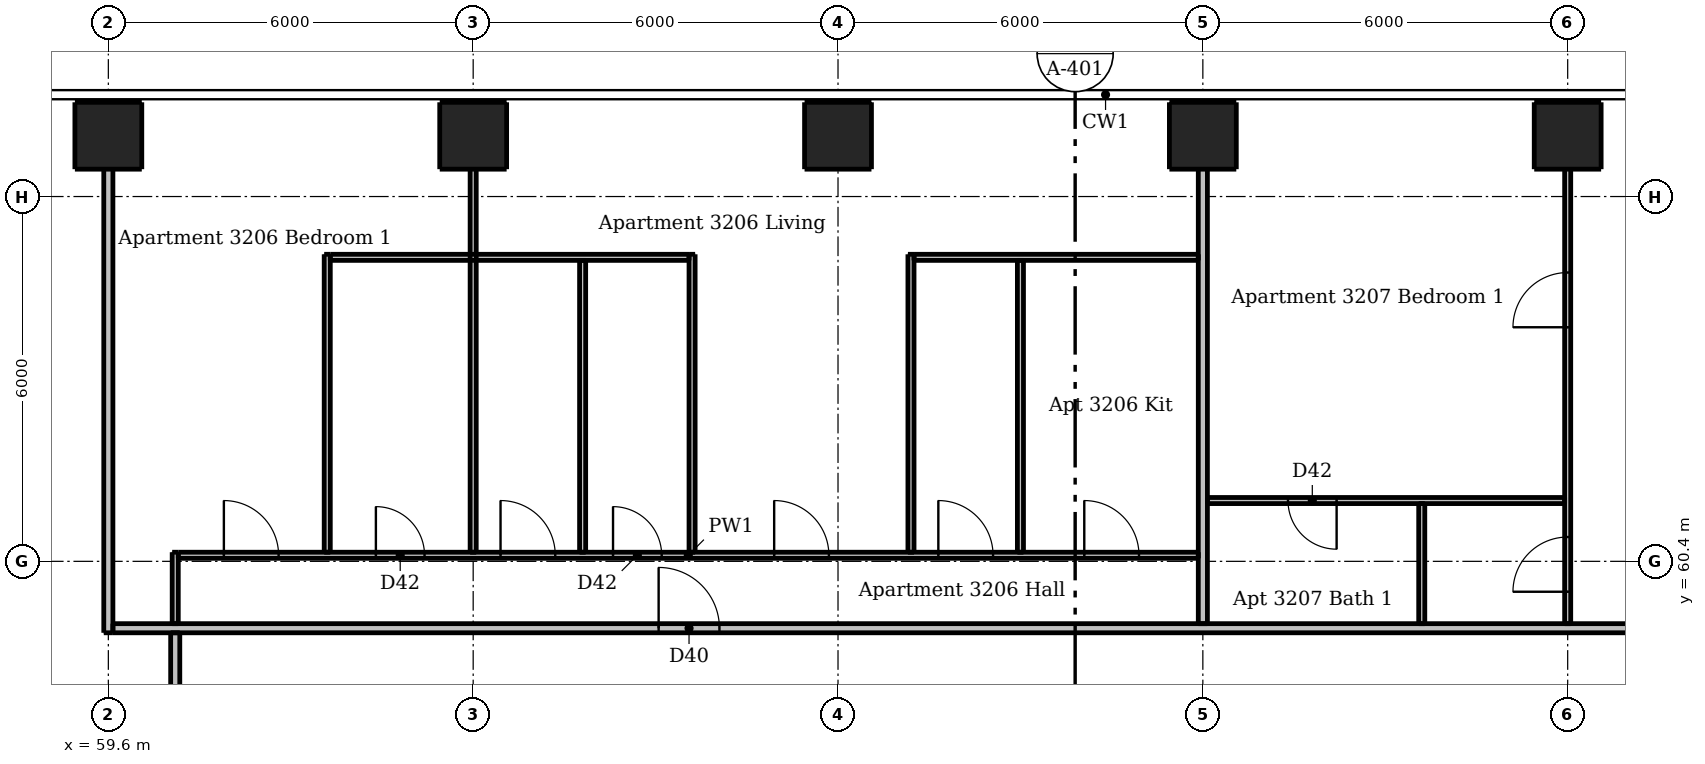
"""IFC4 building model, lengths in metres.
Left out: names, types, materials, properties, quantities, classifications, styles, units other than length and angle.
Written with IfcOpenShell. Run it as: python <this file> out.ifc"""

import sys

from ifc_helpers import new_model, si_unit, direction, frame, frame_2d, origin, origin_2d, place, context, subcontext, project, spatial, rectangle, extrude, element, fill, save


model = new_model("IFC4")
c1 = context("Model", 3, precision=1e-05, world=origin(), true_north=direction((0.0, 1.0)))
c2 = subcontext(c1, "Body", "Model", "MODEL_VIEW")
j1 = project(units=[si_unit("LENGTHUNIT", "METRE"), si_unit("PLANEANGLEUNIT", "RADIAN")], contexts=[c1])
p1 = place(None, origin())
s1 = spatial("IfcSite", under=j1, at=p1, CompositionType="ELEMENT")
p2 = place(p1, origin())
s2 = spatial("IfcBuilding", under=s1, at=p2, CompositionType="ELEMENT")
p3 = place(p2, frame((0.0, 0.0, 118.3)))
s3 = spatial("IfcBuildingStorey", under=s2, at=p3, CompositionType="ELEMENT", Elevation=118.3)
for number, where, z_axis, x_axis in (
    (1, (59.6, 67.4, 0.0), (0.0, 0.0, 1.0), (1.0, 0.0, 0.0)),
    (2, (65.6, 67.4, 0.0), (0.0, 0.0, 1.0), (1.0, 0.0, 0.0)),
    (3, (71.6, 67.4, 0.0), (0.0, 0.0, 1.0), (1.0, 0.0, 0.0)),
    (4, (77.6, 67.4, 0.0), (0.0, 0.0, 1.0), (1.0, 0.0, 0.0)),
    (5, (83.6, 67.4, 0.0), (0.0, 0.0, 1.0), (1.0, 0.0, 0.0)),
):
    element("IfcColumn", number, at=place(p3, frame(where, z_axis=z_axis, x_axis=x_axis)), inside=s3, PredefinedType="COLUMN", context=c2, shape_type="SweptSolid", body=[
        extrude(rectangle(XDim=1.1, YDim=1.1, at=origin_2d()), origin(), (0.0, 0.0, 1.0), 3.05),
    ])
p4 = place(p3, frame((60.7, 59.375, 0.0), z_axis=(0.0, 0.0, 1.0), x_axis=(0.0, 1.0, 0.0)))
e6 = element("IfcWall", 6, at=p4, inside=s3, PredefinedType="PARTITIONING", context=c2, shape_type="SweptSolid", body=[
    extrude(rectangle(XDim=1.175, YDim=0.1, at=frame_2d((0.587, 0.0))), origin(), (0.0, 0.0, 1.0), 3.05),
])
p5 = place(p3, frame((63.2, 60.55, 0.0), z_axis=(0.0, 0.0, 1.0), x_axis=(0.0, 1.0, 0.0)))
e7 = element("IfcWall", 7, at=p5, inside=s3, PredefinedType="PARTITIONING", context=c2, shape_type="SweptSolid", body=[
    extrude(rectangle(XDim=4.9, YDim=0.1, at=frame_2d((2.45, 0.0))), origin(), (0.0, 0.0, 1.0), 3.05),
])
p6 = place(p3, frame((65.6, 60.55, 0.0), z_axis=(0.0, 0.0, 1.0), x_axis=(0.0, 1.0, 0.0)))
e8 = element("IfcWall", 8, at=p6, inside=s3, PredefinedType="PARTITIONING", context=c2, shape_type="SweptSolid", body=[
    extrude(rectangle(XDim=7.45, YDim=0.1, at=frame_2d((3.725, 0.0))), origin(), (0.0, 0.0, 1.0), 2.516),
])
p7 = place(p3, frame((67.4, 60.55, 0.0), z_axis=(0.0, 0.0, 1.0), x_axis=(0.0, 1.0, 0.0)))
e9 = element("IfcWall", 9, at=p7, inside=s3, PredefinedType="PARTITIONING", context=c2, shape_type="SweptSolid", body=[
    extrude(rectangle(XDim=4.8, YDim=0.1, at=frame_2d((2.4, 0.0))), origin(), (0.0, 0.0, 1.0), 3.05),
])
for number, where, z_axis, x_axis in (
    (10, (69.2, 60.55, 0.0), (0.0, 0.0, 1.0), (0.0, 1.0, 0.0)),
    (11, (72.8, 60.55, 0.0), (0.0, 0.0, 1.0), (0.0, 1.0, 0.0)),
):
    element("IfcWall", number, at=place(p3, frame(where, z_axis=z_axis, x_axis=x_axis)), inside=s3, PredefinedType="PARTITIONING", context=c2, shape_type="SweptSolid", body=[
        extrude(rectangle(XDim=4.9, YDim=0.1, at=frame_2d((2.45, 0.0))), origin(), (0.0, 0.0, 1.0), 3.05),
    ])
p8 = place(p3, frame((74.6, 60.55, 0.0), z_axis=(0.0, 0.0, 1.0), x_axis=(0.0, 1.0, 0.0)))
e12 = element("IfcWall", 12, at=p8, inside=s3, PredefinedType="PARTITIONING", context=c2, shape_type="SweptSolid", body=[
    extrude(rectangle(XDim=4.8, YDim=0.1, at=frame_2d((2.4, 0.0))), origin(), (0.0, 0.0, 1.0), 3.05),
])
p9 = place(p3, frame((81.2, 59.375, 0.0), z_axis=(0.0, 0.0, 1.0), x_axis=(0.0, 1.0, 0.0)))
e13 = element("IfcWall", 13, at=p9, inside=s3, PredefinedType="PARTITIONING", context=c2, shape_type="SweptSolid", body=[
    extrude(rectangle(XDim=1.975, YDim=0.1, at=frame_2d((0.988, 0.0))), origin(), (0.0, 0.0, 1.0), 3.05),
])
p10 = place(p3, frame((83.6, 59.375, 0.0), z_axis=(0.0, 0.0, 1.0), x_axis=(0.0, 1.0, 0.0)))
e14 = element("IfcWall", 14, at=p10, inside=s3, PredefinedType="PARTITIONING", context=c2, shape_type="SweptSolid", body=[
    extrude(rectangle(XDim=8.625, YDim=0.1, at=frame_2d((4.312, 0.0))), origin(), (0.0, 0.0, 1.0), 2.516),
])
p11 = place(p10, frame((0.525, 0.0, 0.0)))
e15 = element("IfcOpeningElement", 15, at=p11, cuts=e14, PredefinedType="OPENING", context=c2, shape_type="SweptSolid", body=[
    extrude(rectangle(XDim=0.9, YDim=2.1, at=frame_2d((0.45, 1.05))), frame((0.0, 0.06, 0.0), z_axis=(0.0, -1.0, 0.0), x_axis=(1.0, 0.0, 0.0)), (0.0, 0.0, 1.0), 0.12),
])
p12 = place(p10, frame((4.875, 0.0, 0.0)))
e16 = element("IfcOpeningElement", 16, at=p12, cuts=e14, PredefinedType="OPENING", context=c2, shape_type="SweptSolid", body=[
    extrude(rectangle(XDim=0.9, YDim=2.1, at=frame_2d((0.45, 1.05))), frame((0.0, 0.06, 0.0), z_axis=(0.0, -1.0, 0.0), x_axis=(1.0, 0.0, 0.0)), (0.0, 0.0, 1.0), 0.12),
])
p13 = place(p3, frame((63.25, 65.4, 0.0), z_axis=(0.0, 0.0, 1.0), x_axis=(1.0, 0.0, 0.0)))
e17 = element("IfcWall", 17, at=p13, inside=s3, PredefinedType="PARTITIONING", context=c2, shape_type="SweptSolid", body=[
    extrude(rectangle(XDim=5.9, YDim=0.1, at=frame_2d((2.95, 0.0))), origin(), (0.0, 0.0, 1.0), 3.05),
])
p14 = place(p3, frame((72.85, 65.4, 0.0), z_axis=(0.0, 0.0, 1.0), x_axis=(1.0, 0.0, 0.0)))
e18 = element("IfcWall", 18, at=p14, inside=s3, PredefinedType="PARTITIONING", context=c2, shape_type="SweptSolid", body=[
    extrude(rectangle(XDim=4.675, YDim=0.1, at=frame_2d((2.337, 0.0))), origin(), (0.0, 0.0, 1.0), 3.05),
])
p15 = place(p3, frame((83.55, 61.4, 0.0), z_axis=(0.0, 0.0, 1.0), x_axis=(-1.0, 0.0, 0.0)))
e19 = element("IfcWall", 19, at=p15, inside=s3, PredefinedType="PARTITIONING", context=c2, shape_type="SweptSolid", body=[
    extrude(rectangle(XDim=5.875, YDim=0.1, at=frame_2d((2.938, 0.0))), origin(), (0.0, 0.0, 1.0), 3.05),
])
p16 = place(p15, frame((3.75, 0.0, 0.0)))
e20 = element("IfcOpeningElement", 20, at=p16, cuts=e19, PredefinedType="OPENING", context=c2, shape_type="SweptSolid", body=[
    extrude(rectangle(XDim=0.8, YDim=2.1, at=frame_2d((0.4, 1.05))), frame((0.0, 0.06, 0.0), z_axis=(0.0, -1.0, 0.0), x_axis=(1.0, 0.0, 0.0)), (0.0, 0.0, 1.0), 0.12),
])
p17 = place(p3, frame((60.75, 60.5, 0.0), z_axis=(0.0, 0.0, 1.0), x_axis=(1.0, 0.0, 0.0)))
e21 = element("IfcWall", 21, at=p17, inside=s3, PredefinedType="PARTITIONING", context=c2, shape_type="SweptSolid", body=[
    extrude(rectangle(XDim=16.775, YDim=0.1, at=frame_2d((8.387, 0.0))), origin(), (0.0, 0.0, 1.0), 3.05),
])
p18 = place(p17, frame((9.8, 0.0, 0.0)))
e22 = element("IfcOpeningElement", 22, at=p18, cuts=e21, PredefinedType="OPENING", context=c2, shape_type="SweptSolid", body=[
    extrude(rectangle(XDim=0.9, YDim=2.1, at=frame_2d((0.45, 1.05))), frame((0.0, 0.06, 0.0), z_axis=(0.0, -1.0, 0.0), x_axis=(1.0, 0.0, 0.0)), (0.0, 0.0, 1.0), 0.12),
])
p19 = place(p17, frame((14.9, 0.0, 0.0)))
e23 = element("IfcOpeningElement", 23, at=p19, cuts=e21, PredefinedType="OPENING", context=c2, shape_type="SweptSolid", body=[
    extrude(rectangle(XDim=0.9, YDim=2.1, at=frame_2d((0.45, 1.05))), frame((0.0, 0.06, 0.0), z_axis=(0.0, -1.0, 0.0), x_axis=(1.0, 0.0, 0.0)), (0.0, 0.0, 1.0), 0.12),
])
p20 = place(p17, frame((12.5, 0.0, 0.0)))
e24 = element("IfcOpeningElement", 24, at=p20, cuts=e21, PredefinedType="OPENING", context=c2, shape_type="SweptSolid", body=[
    extrude(rectangle(XDim=0.9, YDim=2.1, at=frame_2d((0.45, 1.05))), frame((0.0, 0.06, 0.0), z_axis=(0.0, -1.0, 0.0), x_axis=(1.0, 0.0, 0.0)), (0.0, 0.0, 1.0), 0.12),
])
p21 = place(p17, frame((5.3, 0.0, 0.0)))
e25 = element("IfcOpeningElement", 25, at=p21, cuts=e21, PredefinedType="OPENING", context=c2, shape_type="SweptSolid", body=[
    extrude(rectangle(XDim=0.9, YDim=2.1, at=frame_2d((0.45, 1.05))), frame((0.0, 0.06, 0.0), z_axis=(0.0, -1.0, 0.0), x_axis=(1.0, 0.0, 0.0)), (0.0, 0.0, 1.0), 0.12),
])
p22 = place(p17, frame((7.15, 0.0, 0.0)))
e26 = element("IfcOpeningElement", 26, at=p22, cuts=e21, PredefinedType="OPENING", context=c2, shape_type="SweptSolid", body=[
    extrude(rectangle(XDim=0.8, YDim=2.1, at=frame_2d((0.4, 1.05))), frame((0.0, 0.06, 0.0), z_axis=(0.0, -1.0, 0.0), x_axis=(1.0, 0.0, 0.0)), (0.0, 0.0, 1.0), 0.12),
])
p23 = place(p17, frame((0.75, 0.0, 0.0)))
e27 = element("IfcOpeningElement", 27, at=p23, cuts=e21, PredefinedType="OPENING", context=c2, shape_type="SweptSolid", body=[
    extrude(rectangle(XDim=0.9, YDim=2.1, at=frame_2d((0.45, 1.05))), frame((0.0, 0.06, 0.0), z_axis=(0.0, -1.0, 0.0), x_axis=(1.0, 0.0, 0.0)), (0.0, 0.0, 1.0), 0.12),
])
p24 = place(p17, frame((3.25, 0.0, 0.0)))
e28 = element("IfcOpeningElement", 28, at=p24, cuts=e21, PredefinedType="OPENING", context=c2, shape_type="SweptSolid", body=[
    extrude(rectangle(XDim=0.8, YDim=2.1, at=frame_2d((0.4, 1.05))), frame((0.0, 0.06, 0.0), z_axis=(0.0, -1.0, 0.0), x_axis=(1.0, 0.0, 0.0)), (0.0, 0.0, 1.0), 0.12),
])
p25 = place(p3, frame((59.6, 59.225, 0.0), z_axis=(0.0, 0.0, 1.0), x_axis=(0.0, 1.0, 0.0)))
e29 = element("IfcWall", 29, at=p25, inside=s3, PredefinedType="PARTITIONING", context=c2, shape_type="SweptSolid", body=[
    extrude(rectangle(XDim=8.775, YDim=0.15, at=frame_2d((4.387, 0.0))), origin(), (0.0, 0.0, 1.0), 2.51),
])
p26 = place(p3, frame((60.7, 30.325, 0.0), z_axis=(0.0, 0.0, 1.0), x_axis=(0.0, 1.0, 0.0)))
e30 = element("IfcWall", 30, at=p26, inside=s3, PredefinedType="PARTITIONING", context=c2, shape_type="SweptSolid", body=[
    extrude(rectangle(XDim=28.9, YDim=0.15, at=frame_2d((14.45, 0.0))), origin(), (0.0, 0.0, 1.0), 3.05),
])
p27 = place(p26, frame((9.225, 0.0, 0.0)))
e31 = element("IfcOpeningElement", 31, at=p27, cuts=e30, PredefinedType="OPENING", context=c2, shape_type="SweptSolid", body=[
    extrude(rectangle(XDim=1.0, YDim=2.1, at=frame_2d((0.5, 1.05))), frame((0.0, 0.085, 0.0), z_axis=(0.0, -1.0, 0.0), x_axis=(1.0, 0.0, 0.0)), (0.0, 0.0, 1.0), 0.17),
])
p28 = place(p26, frame((26.025, 0.0, 0.0)))
e32 = element("IfcOpeningElement", 32, at=p28, cuts=e30, PredefinedType="OPENING", context=c2, shape_type="SweptSolid", body=[
    extrude(rectangle(XDim=1.0, YDim=2.1, at=frame_2d((0.5, 1.05))), frame((0.0, 0.085, 0.0), z_axis=(0.0, -1.0, 0.0), x_axis=(1.0, 0.0, 0.0)), (0.0, 0.0, 1.0), 0.17),
])
p29 = place(p3, frame((77.6, 59.375, 0.0), z_axis=(0.0, 0.0, 1.0), x_axis=(0.0, 1.0, 0.0)))
e33 = element("IfcWall", 33, at=p29, inside=s3, PredefinedType="PARTITIONING", context=c2, shape_type="SweptSolid", body=[
    extrude(rectangle(XDim=8.625, YDim=0.15, at=frame_2d((4.312, 0.0))), origin(), (0.0, 0.0, 1.0), 2.516),
])
p30 = place(p3, frame((59.675, 59.3, 0.0), z_axis=(0.0, 0.0, 1.0), x_axis=(1.0, 0.0, 0.0)))
e34 = element("IfcWall", 34, at=p30, inside=s3, PredefinedType="PARTITIONING", context=c2, shape_type="SweptSolid", body=[
    extrude(rectangle(XDim=28.55, YDim=0.15, at=frame_2d((14.275, 0.0))), origin(), (0.0, 0.0, 1.0), 3.05),
])
p31 = place(p30, frame((8.975, 0.0, 0.0)))
e35 = element("IfcOpeningElement", 35, at=p31, cuts=e34, PredefinedType="OPENING", context=c2, shape_type="SweptSolid", body=[
    extrude(rectangle(XDim=1.0, YDim=2.1, at=frame_2d((0.5, 1.05))), frame((0.0, 0.085, 0.0), z_axis=(0.0, -1.0, 0.0), x_axis=(1.0, 0.0, 0.0)), (0.0, 0.0, 1.0), 0.17),
])
p32 = place(p30, frame((25.775, 0.0, 0.0)))
e36 = element("IfcOpeningElement", 36, at=p32, cuts=e34, PredefinedType="OPENING", context=c2, shape_type="SweptSolid", body=[
    extrude(rectangle(XDim=1.0, YDim=2.1, at=frame_2d((0.5, 1.05))), frame((0.0, 0.085, 0.0), z_axis=(0.0, -1.0, 0.0), x_axis=(1.0, 0.0, 0.0)), (0.0, 0.0, 1.0), 0.17),
])
p33 = place(p31, origin())
e37 = element("IfcDoor", 37, at=p33, inside=s3, OperationType="SINGLE_SWING_LEFT", PredefinedType="DOOR", context=c2, shape_type="SweptSolid", body=[
    extrude(rectangle(XDim=1.0, YDim=2.1, at=frame_2d((0.5, 1.05))), frame((0.0, 0.025, 0.0), z_axis=(0.0, -1.0, 0.0), x_axis=(1.0, 0.0, 0.0)), (0.0, 0.0, 1.0), 0.05),
])
fill(e35, e37)
p34 = place(p18, origin())
e38 = element("IfcDoor", 38, at=p34, inside=s3, OperationType="SINGLE_SWING_LEFT", PredefinedType="DOOR", context=c2, shape_type="SweptSolid", body=[
    extrude(rectangle(XDim=0.9, YDim=2.1, at=frame_2d((0.45, 1.05))), frame((0.0, 0.025, 0.0), z_axis=(0.0, -1.0, 0.0), x_axis=(1.0, 0.0, 0.0)), (0.0, 0.0, 1.0), 0.05),
])
fill(e22, e38)
p35 = place(p19, origin())
e39 = element("IfcDoor", 39, at=p35, inside=s3, OperationType="SINGLE_SWING_LEFT", PredefinedType="DOOR", context=c2, shape_type="SweptSolid", body=[
    extrude(rectangle(XDim=0.9, YDim=2.1, at=frame_2d((0.45, 1.05))), frame((0.0, 0.025, 0.0), z_axis=(0.0, -1.0, 0.0), x_axis=(1.0, 0.0, 0.0)), (0.0, 0.0, 1.0), 0.05),
])
fill(e23, e39)
p36 = place(p20, origin())
e40 = element("IfcDoor", 40, at=p36, inside=s3, OperationType="SINGLE_SWING_LEFT", PredefinedType="DOOR", context=c2, shape_type="SweptSolid", body=[
    extrude(rectangle(XDim=0.9, YDim=2.1, at=frame_2d((0.45, 1.05))), frame((0.0, 0.025, 0.0), z_axis=(0.0, -1.0, 0.0), x_axis=(1.0, 0.0, 0.0)), (0.0, 0.0, 1.0), 0.05),
])
fill(e24, e40)
p37 = place(p21, origin())
e41 = element("IfcDoor", 41, at=p37, inside=s3, OperationType="SINGLE_SWING_LEFT", PredefinedType="DOOR", context=c2, shape_type="SweptSolid", body=[
    extrude(rectangle(XDim=0.9, YDim=2.1, at=frame_2d((0.45, 1.05))), frame((0.0, 0.025, 0.0), z_axis=(0.0, -1.0, 0.0), x_axis=(1.0, 0.0, 0.0)), (0.0, 0.0, 1.0), 0.05),
])
fill(e25, e41)
p38 = place(p22, origin())
e42 = element("IfcDoor", 42, at=p38, inside=s3, OperationType="SINGLE_SWING_LEFT", PredefinedType="DOOR", context=c2, shape_type="SweptSolid", body=[
    extrude(rectangle(XDim=0.8, YDim=2.1, at=frame_2d((0.4, 1.05))), frame((0.0, 0.025, 0.0), z_axis=(0.0, -1.0, 0.0), x_axis=(1.0, 0.0, 0.0)), (0.0, 0.0, 1.0), 0.05),
])
fill(e26, e42)
p39 = place(p23, origin())
e43 = element("IfcDoor", 43, at=p39, inside=s3, OperationType="SINGLE_SWING_LEFT", PredefinedType="DOOR", context=c2, shape_type="SweptSolid", body=[
    extrude(rectangle(XDim=0.9, YDim=2.1, at=frame_2d((0.45, 1.05))), frame((0.0, 0.025, 0.0), z_axis=(0.0, -1.0, 0.0), x_axis=(1.0, 0.0, 0.0)), (0.0, 0.0, 1.0), 0.05),
])
fill(e27, e43)
p40 = place(p24, origin())
e44 = element("IfcDoor", 44, at=p40, inside=s3, OperationType="SINGLE_SWING_LEFT", PredefinedType="DOOR", context=c2, shape_type="SweptSolid", body=[
    extrude(rectangle(XDim=0.8, YDim=2.1, at=frame_2d((0.4, 1.05))), frame((0.0, 0.025, 0.0), z_axis=(0.0, -1.0, 0.0), x_axis=(1.0, 0.0, 0.0)), (0.0, 0.0, 1.0), 0.05),
])
fill(e28, e44)
p41 = place(p11, origin())
e45 = element("IfcDoor", 45, at=p41, inside=s3, OperationType="SINGLE_SWING_LEFT", PredefinedType="DOOR", context=c2, shape_type="SweptSolid", body=[
    extrude(rectangle(XDim=0.9, YDim=2.1, at=frame_2d((0.45, 1.05))), frame((0.0, 0.025, 0.0), z_axis=(0.0, -1.0, 0.0), x_axis=(1.0, 0.0, 0.0)), (0.0, 0.0, 1.0), 0.05),
])
fill(e15, e45)
p42 = place(p12, origin())
e46 = element("IfcDoor", 46, at=p42, inside=s3, OperationType="SINGLE_SWING_LEFT", PredefinedType="DOOR", context=c2, shape_type="SweptSolid", body=[
    extrude(rectangle(XDim=0.9, YDim=2.1, at=frame_2d((0.45, 1.05))), frame((0.0, 0.025, 0.0), z_axis=(0.0, -1.0, 0.0), x_axis=(1.0, 0.0, 0.0)), (0.0, 0.0, 1.0), 0.05),
])
fill(e16, e46)
p43 = place(p16, origin())
e47 = element("IfcDoor", 47, at=p43, inside=s3, OperationType="SINGLE_SWING_LEFT", PredefinedType="DOOR", context=c2, shape_type="SweptSolid", body=[
    extrude(rectangle(XDim=0.8, YDim=2.1, at=frame_2d((0.4, 1.05))), frame((0.0, 0.025, 0.0), z_axis=(0.0, -1.0, 0.0), x_axis=(1.0, 0.0, 0.0)), (0.0, 0.0, 1.0), 0.05),
])
fill(e20, e47)
save(model, sys.argv[1])
